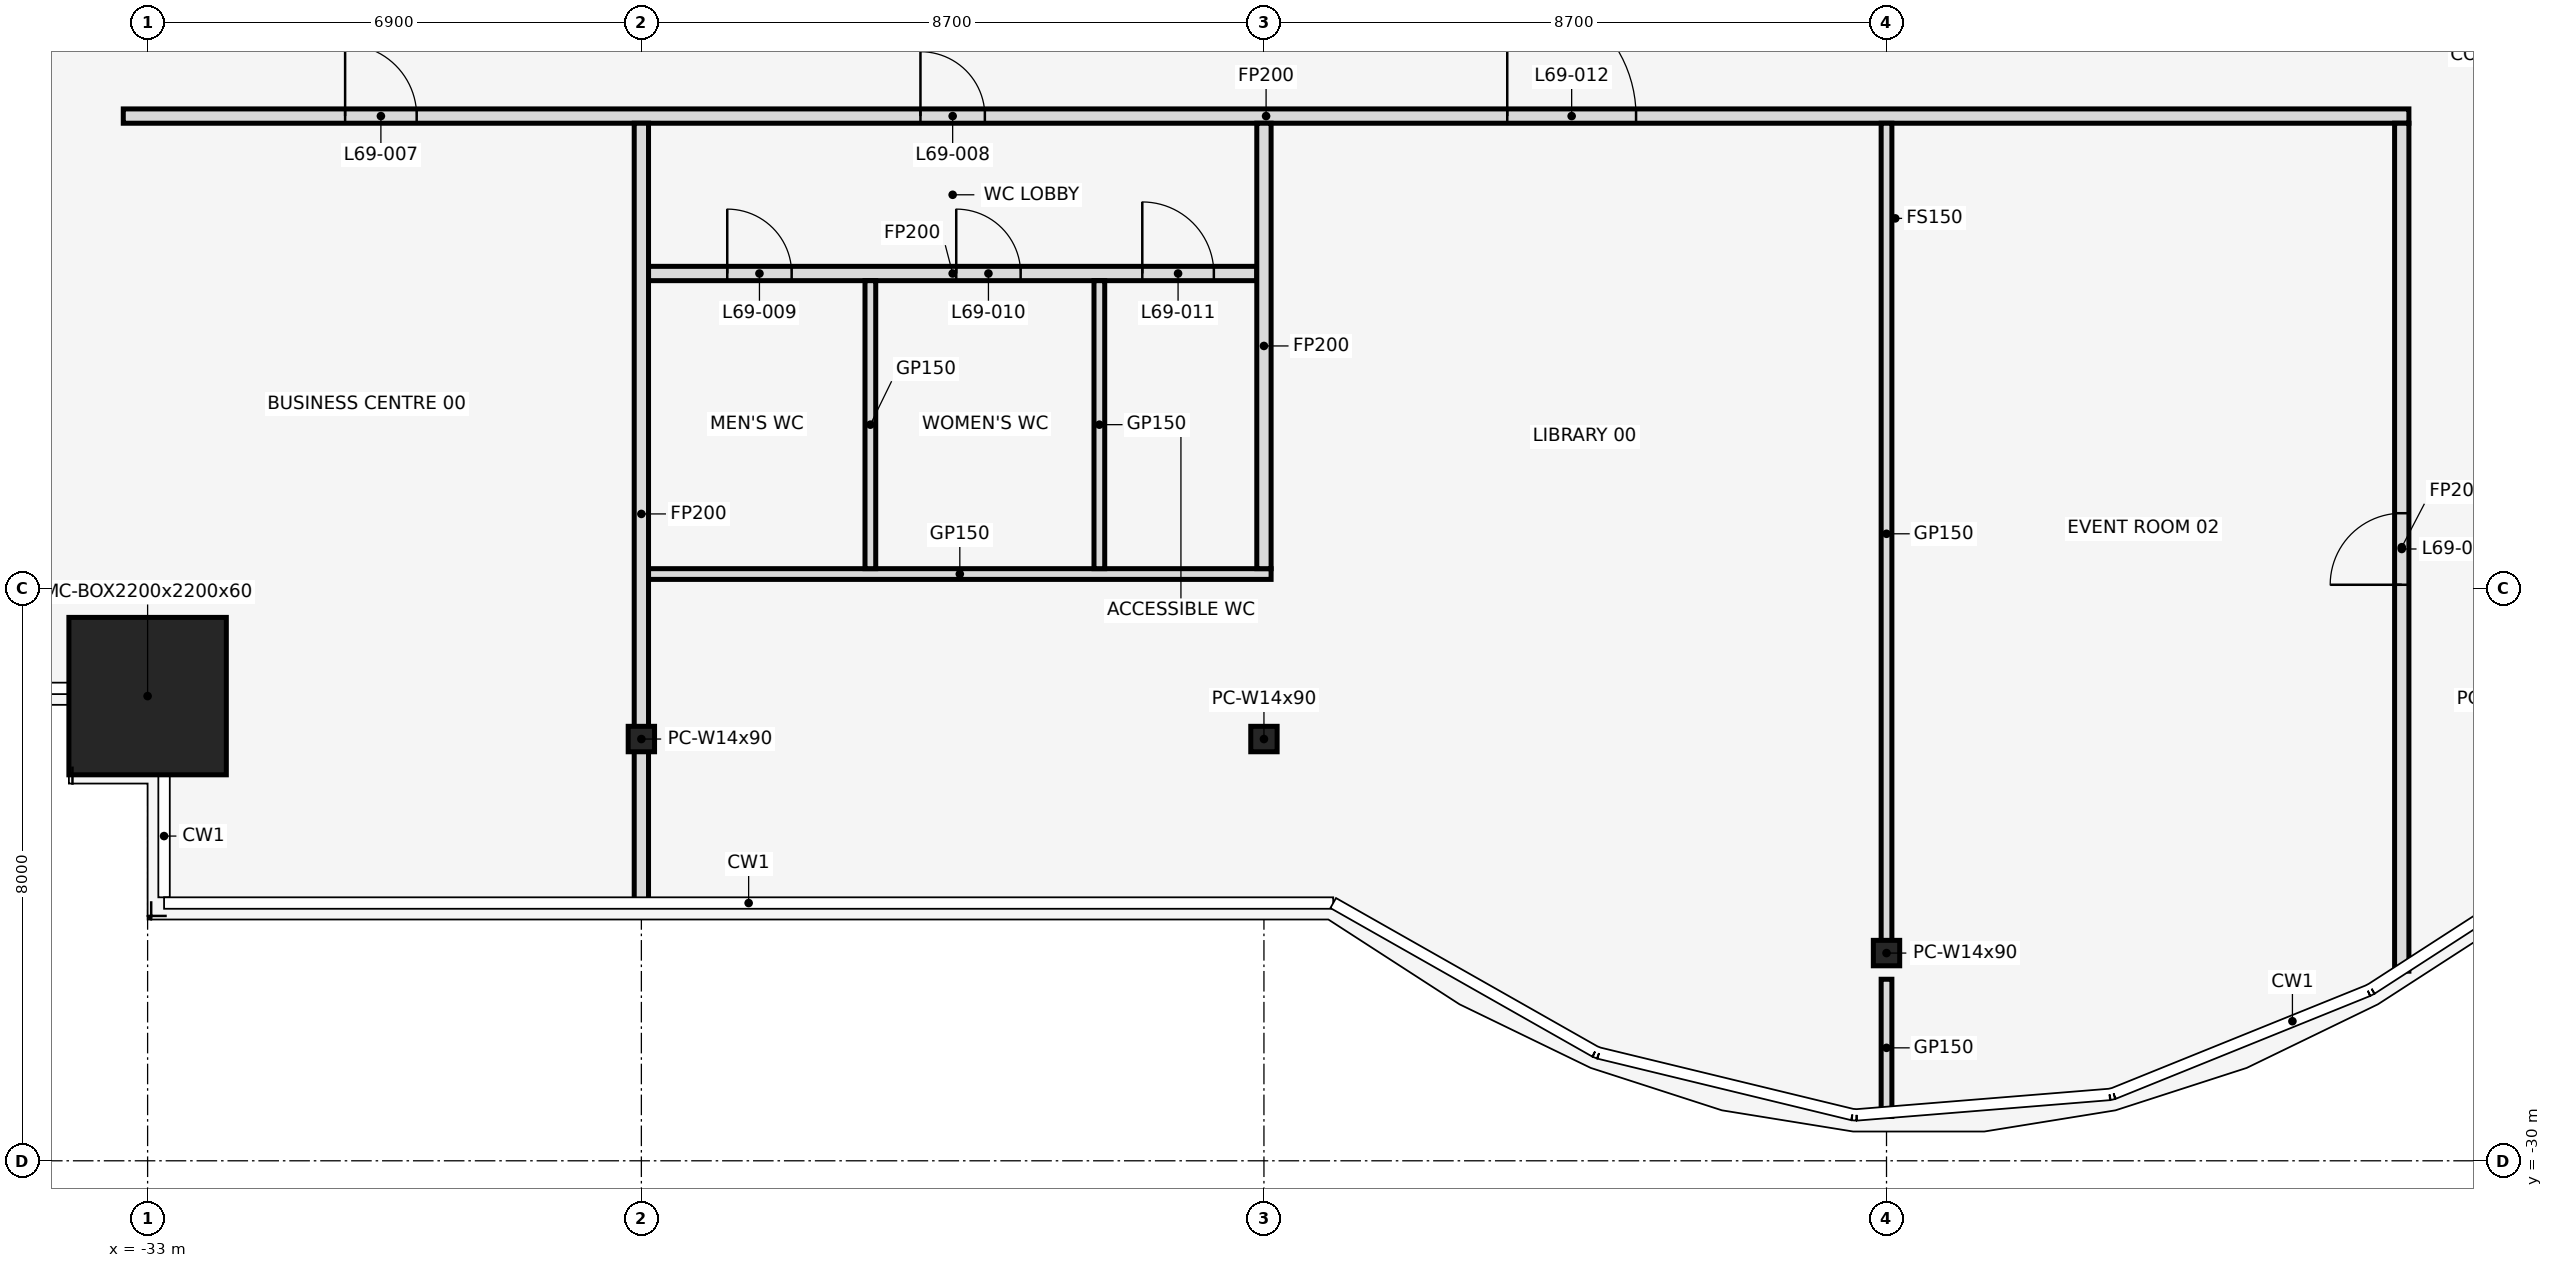
"""IFC4 building model, lengths in metres.
Left out: names, types, materials, properties, quantities, classifications, styles, units other than length and angle.
Written with IfcOpenShell. Run it as: python <this file> out.ifc"""

import sys

from ifc_helpers import new_model, si_unit, direction, frame, frame_2d, origin, origin_2d, place, context, subcontext, project, spatial, rectangle, hollow_rectangle, i_section, extrude, element, fill, save


model = new_model("IFC4")
c1 = context("Model", 3, precision=1e-05, world=origin(), true_north=direction((0.0, 1.0)))
c2 = subcontext(c1, "Body", "Model", "MODEL_VIEW")
j1 = project(units=[si_unit("LENGTHUNIT", "METRE"), si_unit("PLANEANGLEUNIT", "RADIAN")], contexts=[c1])
p1 = place(None, origin())
s1 = spatial("IfcSite", under=j1, at=p1, CompositionType="ELEMENT")
p2 = place(p1, origin())
s2 = spatial("IfcBuilding", under=s1, at=p2, CompositionType="ELEMENT")
p3 = place(p2, frame((0.0, 0.0, 306.5)))
s3 = spatial("IfcBuildingStorey", under=s2, at=p3, CompositionType="ELEMENT", Elevation=306.5)
p4 = place(p3, frame((-33.0, -23.506, 0.0), z_axis=(0.0, 0.0, 1.0), x_axis=(1.0, 0.0, 0.0)))
e1 = element("IfcColumn", 1, at=p4, inside=s3, PredefinedType="COLUMN", context=c2, shape_type="SweptSolid", body=[
    extrude(hollow_rectangle(XDim=2.2, YDim=2.2, WallThickness=0.06, at=origin_2d()), origin(), (0.0, 0.0, 1.0), 4.5),
])
for number, where, z_axis, x_axis in (
    (2, (-26.1, -24.106, 0.0), (0.0, 0.0, 1.0), (1.0, 0.0, 0.0)),
    (3, (-17.4, -24.106, 0.0), (0.0, 0.0, 1.0), (1.0, 0.0, 0.0)),
    (4, (-8.7, -27.097, 0.0), (0.0, 0.0, 1.0), (1.0, 0.0, 0.0)),
):
    element("IfcColumn", number, at=place(p3, frame(where, z_axis=z_axis, x_axis=x_axis)), inside=s3, PredefinedType="COLUMN", context=c2, shape_type="SweptSolid", body=[
        extrude(i_section(OverallWidth=0.368, OverallDepth=0.356, WebThickness=0.011, FlangeThickness=0.018, at=origin_2d()), origin(), (0.0, 0.0, 1.0), 4.5),
    ])
p5 = place(p3, frame((-26.0, -21.8, 0.0), z_axis=(0.0, 0.0, 1.0), x_axis=(1.0, 0.0, 0.0)))
e5 = element("IfcWall", 5, at=p5, inside=s3, PredefinedType="PARTITIONING", context=c2, shape_type="SweptSolid", body=[
    extrude(rectangle(XDim=8.7, YDim=0.15, at=frame_2d((4.35, 0.0))), origin(), (0.0, 0.0, 1.0), 3.418),
])
p6 = place(p3, frame((-26.0, -17.6, 0.0), z_axis=(0.0, 0.0, 1.0), x_axis=(1.0, 0.0, 0.0)))
e6 = element("IfcWall", 6, at=p6, inside=s3, PredefinedType="PARTITIONING", context=c2, shape_type="SweptSolid", body=[
    extrude(rectangle(XDim=8.5, YDim=0.2, at=frame_2d((4.25, 0.0))), origin(), (0.0, 0.0, 1.0), 3.418),
])
p7 = place(p6, frame((1.1, 0.0, 0.0)))
e7 = element("IfcOpeningElement", 7, at=p7, cuts=e6, PredefinedType="OPENING", context=c2, shape_type="SweptSolid", body=[
    extrude(rectangle(XDim=0.9, YDim=2.1, at=frame_2d((0.45, 1.05))), frame((0.0, 0.112, 0.0), z_axis=(0.0, -1.0, 0.0), x_axis=(1.0, 0.0, 0.0)), (0.0, 0.0, 1.0), 0.224),
])
p8 = place(p6, frame((4.3, 0.0, 0.0)))
e8 = element("IfcOpeningElement", 8, at=p8, cuts=e6, PredefinedType="OPENING", context=c2, shape_type="SweptSolid", body=[
    extrude(rectangle(XDim=0.9, YDim=2.1, at=frame_2d((0.45, 1.05))), frame((0.0, 0.112, 0.0), z_axis=(0.0, -1.0, 0.0), x_axis=(1.0, 0.0, 0.0)), (0.0, 0.0, 1.0), 0.224),
])
p9 = place(p6, frame((6.9, 0.0, 0.0)))
e9 = element("IfcOpeningElement", 9, at=p9, cuts=e6, PredefinedType="OPENING", context=c2, shape_type="SweptSolid", body=[
    extrude(rectangle(XDim=1.0, YDim=2.1, at=frame_2d((0.5, 1.05))), frame((0.0, 0.112, 0.0), z_axis=(0.0, -1.0, 0.0), x_axis=(1.0, 0.0, 0.0)), (0.0, 0.0, 1.0), 0.224),
])
p10 = place(p3, frame((-33.34, -15.4, 0.0), z_axis=(0.0, 0.0, 1.0), x_axis=(1.0, 0.0, 0.0)))
e10 = element("IfcWall", 10, at=p10, inside=s3, PredefinedType="PARTITIONING", context=c2, shape_type="SweptSolid", body=[
    extrude(rectangle(XDim=31.94, YDim=0.2, at=frame_2d((15.97, 0.0))), origin(), (0.0, 0.0, 1.0), 3.418),
])
p11 = place(p10, frame((3.1, 0.0, 0.0)))
e11 = element("IfcOpeningElement", 11, at=p11, cuts=e10, PredefinedType="OPENING", context=c2, shape_type="SweptSolid", body=[
    extrude(rectangle(XDim=1.0, YDim=2.1, at=frame_2d((0.5, 1.05))), frame((0.0, 0.112, 0.0), z_axis=(0.0, -1.0, 0.0), x_axis=(1.0, 0.0, 0.0)), (0.0, 0.0, 1.0), 0.224),
])
p12 = place(p10, frame((11.14, 0.0, 0.0)))
e12 = element("IfcOpeningElement", 12, at=p12, cuts=e10, PredefinedType="OPENING", context=c2, shape_type="SweptSolid", body=[
    extrude(rectangle(XDim=0.9, YDim=2.1, at=frame_2d((0.45, 1.05))), frame((0.0, 0.112, 0.0), z_axis=(0.0, -1.0, 0.0), x_axis=(1.0, 0.0, 0.0)), (0.0, 0.0, 1.0), 0.224),
])
p13 = place(p10, frame((19.34, 0.0, 0.0)))
e13 = element("IfcOpeningElement", 13, at=p13, cuts=e10, PredefinedType="OPENING", context=c2, shape_type="SweptSolid", body=[
    extrude(rectangle(XDim=1.8, YDim=2.1, at=frame_2d((0.9, 1.05))), frame((0.0, 0.112, 0.0), z_axis=(0.0, -1.0, 0.0), x_axis=(1.0, 0.0, 0.0)), (0.0, 0.0, 1.0), 0.224),
])
p14 = place(p3, frame((-26.1, -26.42, 0.0), z_axis=(0.0, 0.0, 1.0), x_axis=(0.0, 1.0, 0.0)))
e14 = element("IfcWall", 14, at=p14, inside=s3, PredefinedType="PARTITIONING", context=c2, shape_type="SweptSolid", body=[
    extrude(rectangle(XDim=10.92, YDim=0.2, at=frame_2d((5.46, 0.0))), origin(), (0.0, 0.0, 1.0), 3.418),
])
for number, where, z_axis, x_axis in (
    (15, (-22.9, -21.725, 0.0), (0.0, 0.0, 1.0), (0.0, 1.0, 0.0)),
    (16, (-19.7, -21.725, 0.0), (0.0, 0.0, 1.0), (0.0, 1.0, 0.0)),
):
    element("IfcWall", number, at=place(p3, frame(where, z_axis=z_axis, x_axis=x_axis)), inside=s3, PredefinedType="PARTITIONING", context=c2, shape_type="SweptSolid", body=[
        extrude(rectangle(XDim=4.025, YDim=0.15, at=frame_2d((2.013, 0.0))), origin(), (0.0, 0.0, 1.0), 3.418),
    ])
p15 = place(p3, frame((-17.4, -21.725, 0.0), z_axis=(0.0, 0.0, 1.0), x_axis=(0.0, 1.0, 0.0)))
e17 = element("IfcWall", 17, at=p15, inside=s3, PredefinedType="PARTITIONING", context=c2, shape_type="SweptSolid", body=[
    extrude(rectangle(XDim=6.225, YDim=0.2, at=frame_2d((3.113, 0.0))), origin(), (0.0, 0.0, 1.0), 3.418),
])
p16 = place(p3, frame((-8.7, -29.38, 0.0), z_axis=(0.0, 0.0, 1.0), x_axis=(0.0, 1.0, 0.0)))
e18 = element("IfcWall", 18, at=p16, inside=s3, PredefinedType="PARTITIONING", context=c2, shape_type="SweptSolid", body=[
    extrude(rectangle(XDim=1.917, YDim=0.15, at=frame_2d((0.958, 0.0))), origin(), (0.0, 0.0, 1.0), 3.418),
])
p17 = place(p3, frame((-8.7, -26.975, 0.0), z_axis=(0.0, 0.0, 1.0), x_axis=(0.0, 1.0, 0.0)))
e19 = element("IfcWall", 19, at=p17, inside=s3, PredefinedType="PARTITIONING", context=c2, shape_type="SweptSolid", body=[
    extrude(rectangle(XDim=11.475, YDim=0.15, at=frame_2d((5.738, 0.0))), origin(), (0.0, 0.0, 1.0), 3.418),
])
p18 = place(p3, frame((-1.5, -27.35, 0.0), z_axis=(0.0, 0.0, 1.0), x_axis=(0.0, 1.0, 0.0)))
e20 = element("IfcWall", 20, at=p18, inside=s3, PredefinedType="PARTITIONING", context=c2, shape_type="SweptSolid", body=[
    extrude(rectangle(XDim=11.85, YDim=0.2, at=frame_2d((5.925, 0.0))), origin(), (0.0, 0.0, 1.0), 3.418),
])
p19 = place(p18, frame((5.4, 0.0, 0.0)))
e21 = element("IfcOpeningElement", 21, at=p19, cuts=e20, PredefinedType="OPENING", context=c2, shape_type="SweptSolid", body=[
    extrude(rectangle(XDim=1.0, YDim=2.1, at=frame_2d((0.5, 1.05))), frame((0.0, 0.112, 0.0), z_axis=(0.0, -1.0, 0.0), x_axis=(1.0, 0.0, 0.0)), (0.0, 0.0, 1.0), 0.224),
])
p20 = place(p11, frame((1.0, 0.0, 0.0), z_axis=(0.0, 0.0, 1.0), x_axis=(-1.0, 0.0, 0.0)))
e22 = element("IfcDoor", 22, at=p20, inside=s3, OperationType="SINGLE_SWING_LEFT", PredefinedType="DOOR", context=c2, shape_type="SweptSolid", body=[
    extrude(rectangle(XDim=1.0, YDim=2.1, at=frame_2d((0.5, 1.05))), frame((0.0, 0.025, 0.0), z_axis=(0.0, -1.0, 0.0), x_axis=(1.0, 0.0, 0.0)), (0.0, 0.0, 1.0), 0.05),
])
fill(e11, e22)
p21 = place(p12, frame((0.9, 0.0, 0.0), z_axis=(0.0, 0.0, 1.0), x_axis=(-1.0, 0.0, 0.0)))
e23 = element("IfcDoor", 23, at=p21, inside=s3, OperationType="SINGLE_SWING_RIGHT", PredefinedType="DOOR", context=c2, shape_type="SweptSolid", body=[
    extrude(rectangle(XDim=0.9, YDim=2.1, at=frame_2d((0.45, 1.05))), frame((0.0, 0.025, 0.0), z_axis=(0.0, -1.0, 0.0), x_axis=(1.0, 0.0, 0.0)), (0.0, 0.0, 1.0), 0.05),
])
fill(e12, e23)
p22 = place(p7, frame((0.9, 0.0, 0.0), z_axis=(0.0, 0.0, 1.0), x_axis=(-1.0, 0.0, 0.0)))
e24 = element("IfcDoor", 24, at=p22, inside=s3, OperationType="SINGLE_SWING_RIGHT", PredefinedType="DOOR", context=c2, shape_type="SweptSolid", body=[
    extrude(rectangle(XDim=0.9, YDim=2.1, at=frame_2d((0.45, 1.05))), frame((0.0, 0.025, 0.0), z_axis=(0.0, -1.0, 0.0), x_axis=(1.0, 0.0, 0.0)), (0.0, 0.0, 1.0), 0.05),
])
fill(e7, e24)
p23 = place(p8, frame((0.9, 0.0, 0.0), z_axis=(0.0, 0.0, 1.0), x_axis=(-1.0, 0.0, 0.0)))
e25 = element("IfcDoor", 25, at=p23, inside=s3, OperationType="SINGLE_SWING_LEFT", PredefinedType="DOOR", context=c2, shape_type="SweptSolid", body=[
    extrude(rectangle(XDim=0.9, YDim=2.1, at=frame_2d((0.45, 1.05))), frame((0.0, 0.025, 0.0), z_axis=(0.0, -1.0, 0.0), x_axis=(1.0, 0.0, 0.0)), (0.0, 0.0, 1.0), 0.05),
])
fill(e8, e25)
p24 = place(p9, frame((1.0, 0.0, 0.0), z_axis=(0.0, 0.0, 1.0), x_axis=(-1.0, 0.0, 0.0)))
e26 = element("IfcDoor", 26, at=p24, inside=s3, OperationType="SINGLE_SWING_RIGHT", PredefinedType="DOOR", context=c2, shape_type="SweptSolid", body=[
    extrude(rectangle(XDim=1.0, YDim=2.1, at=frame_2d((0.5, 1.05))), frame((0.0, 0.025, 0.0), z_axis=(0.0, -1.0, 0.0), x_axis=(1.0, 0.0, 0.0)), (0.0, 0.0, 1.0), 0.05),
])
fill(e9, e26)
p25 = place(p13, origin())
e27 = element("IfcDoor", 27, at=p25, inside=s3, OperationType="SINGLE_SWING_LEFT", PredefinedType="DOOR", context=c2, shape_type="SweptSolid", body=[
    extrude(rectangle(XDim=1.8, YDim=2.1, at=frame_2d((0.9, 1.05))), frame((0.0, 0.025, 0.0), z_axis=(0.0, -1.0, 0.0), x_axis=(1.0, 0.0, 0.0)), (0.0, 0.0, 1.0), 0.05),
])
fill(e13, e27)
p26 = place(p19, origin())
e28 = element("IfcDoor", 28, at=p26, inside=s3, OperationType="SINGLE_SWING_LEFT", PredefinedType="DOOR", context=c2, shape_type="SweptSolid", body=[
    extrude(rectangle(XDim=1.0, YDim=2.1, at=frame_2d((0.5, 1.05))), frame((0.0, 0.025, 0.0), z_axis=(0.0, -1.0, 0.0), x_axis=(1.0, 0.0, 0.0)), (0.0, 0.0, 1.0), 0.05),
])
fill(e21, e28)
save(model, sys.argv[1])
